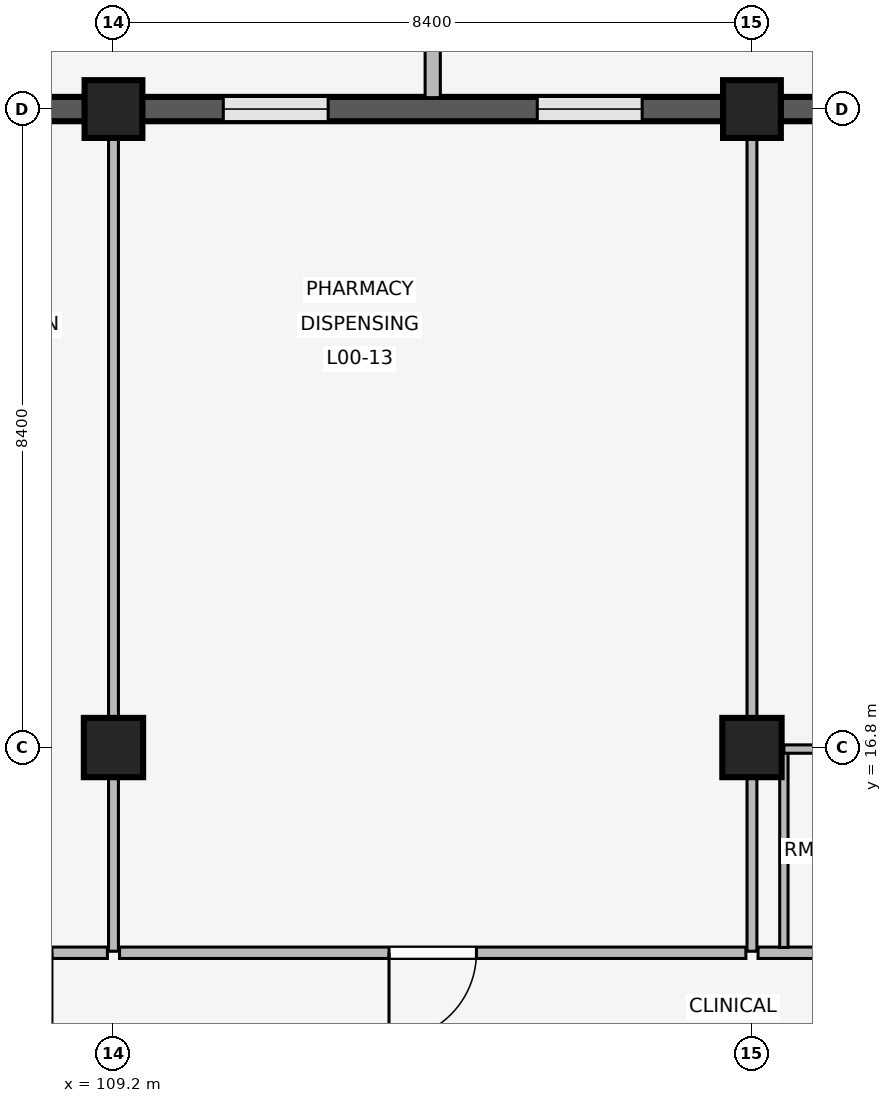
"""IFC4 building model, lengths in metres.
Left out: names, types, materials, properties, quantities, classifications, styles, units other than length and angle.
Written with IfcOpenShell. Run it as: python <this file> out.ifc"""

import sys

from ifc_helpers import new_model, si_unit, direction, frame, frame_2d, origin, origin_2d, place, context, subcontext, project, spatial, rectangle, extrude, element, fill, save


model = new_model("IFC4")
c1 = context("Model", 3, precision=1e-05, world=origin(), true_north=direction((0.0, 1.0)))
c2 = subcontext(c1, "Body", "Model", "MODEL_VIEW")
j1 = project(units=[si_unit("LENGTHUNIT", "METRE"), si_unit("PLANEANGLEUNIT", "RADIAN")], contexts=[c1])
p1 = place(None, origin())
s1 = spatial("IfcSite", under=j1, at=p1, CompositionType="ELEMENT")
p2 = place(p1, origin())
s2 = spatial("IfcBuilding", under=s1, at=p2, CompositionType="ELEMENT")
p3 = place(p2, origin())
s3 = spatial("IfcBuildingStorey", under=s2, at=p3, CompositionType="ELEMENT", Elevation=0.0)
p4 = place(p3, frame((109.2, 16.8, 0.0), z_axis=(0.0, 0.0, 1.0), x_axis=(1.0, 0.0, 0.0)))
e1 = element("IfcColumn", 1, at=p4, inside=s3, PredefinedType="COLUMN", context=c2, shape_type="SweptSolid", body=[
    extrude(rectangle(XDim=0.78, YDim=0.78, at=origin_2d()), origin(), (0.0, 0.0, 1.0), 4.8),
])
p5 = place(p3, frame((109.2, 25.2, 0.0), z_axis=(0.0, 0.0, 1.0), x_axis=(1.0, 0.0, 0.0)))
e2 = element("IfcColumn", 2, at=p5, inside=s3, PredefinedType="COLUMN", context=c2, shape_type="SweptSolid", body=[
    extrude(rectangle(XDim=0.76, YDim=0.76, at=origin_2d()), origin(), (0.0, 0.0, 1.0), 4.8),
])
p6 = place(p3, frame((117.6, 16.8, 0.0), z_axis=(0.0, 0.0, 1.0), x_axis=(1.0, 0.0, 0.0)))
e3 = element("IfcColumn", 3, at=p6, inside=s3, PredefinedType="COLUMN", context=c2, shape_type="SweptSolid", body=[
    extrude(rectangle(XDim=0.78, YDim=0.78, at=origin_2d()), origin(), (0.0, 0.0, 1.0), 4.8),
])
p7 = place(p3, frame((117.6, 25.2, 0.0), z_axis=(0.0, 0.0, 1.0), x_axis=(1.0, 0.0, 0.0)))
e4 = element("IfcColumn", 4, at=p7, inside=s3, PredefinedType="COLUMN", context=c2, shape_type="SweptSolid", body=[
    extrude(rectangle(XDim=0.76, YDim=0.76, at=origin_2d()), origin(), (0.0, 0.0, 1.0), 4.8),
])
p8 = place(p3, frame((101.175, 25.2, 0.0), z_axis=(0.0, 0.0, 1.0), x_axis=(1.0, 0.0, 0.0)))
e5 = element("IfcWall", 5, at=p8, inside=s3, PredefinedType="SOLIDWALL", context=c2, shape_type="SweptSolid", body=[
    extrude(rectangle(XDim=7.65, YDim=0.32, at=frame_2d((3.825, 0.0))), origin(), (0.0, 0.0, 1.0), 3.82),
])
p9 = place(p8, frame((0.919, 0.0, 0.85)))
e6 = element("IfcOpeningElement", 6, at=p9, cuts=e5, PredefinedType="OPENING", context=c2, shape_type="SweptSolid", body=[
    extrude(rectangle(XDim=1.68, YDim=2.05, at=frame_2d((0.84, 1.025))), frame((0.0, 0.17, 0.0), z_axis=(0.0, -1.0, 0.0), x_axis=(1.0, 0.0, 0.0)), (0.0, 0.0, 1.0), 0.34),
])
p10 = place(p8, frame((5.051, 0.0, 0.85)))
e7 = element("IfcOpeningElement", 7, at=p10, cuts=e5, PredefinedType="OPENING", context=c2, shape_type="SweptSolid", body=[
    extrude(rectangle(XDim=1.68, YDim=2.05, at=frame_2d((0.84, 1.025))), frame((0.0, 0.17, 0.0), z_axis=(0.0, -1.0, 0.0), x_axis=(1.0, 0.0, 0.0)), (0.0, 0.0, 1.0), 0.34),
])
p11 = place(p3, frame((109.575, 25.2, 0.0), z_axis=(0.0, 0.0, 1.0), x_axis=(1.0, 0.0, 0.0)))
e8 = element("IfcWall", 8, at=p11, inside=s3, PredefinedType="SOLIDWALL", context=c2, shape_type="SweptSolid", body=[
    extrude(rectangle(XDim=7.65, YDim=0.32, at=frame_2d((3.825, 0.0))), origin(), (0.0, 0.0, 1.0), 3.82),
])
p12 = place(p11, frame((1.07, 0.0, 0.85)))
e9 = element("IfcOpeningElement", 9, at=p12, cuts=e8, PredefinedType="OPENING", context=c2, shape_type="SweptSolid", body=[
    extrude(rectangle(XDim=1.38, YDim=1.5, at=frame_2d((0.69, 0.75))), frame((0.0, 0.17, 0.0), z_axis=(0.0, -1.0, 0.0), x_axis=(1.0, 0.0, 0.0)), (0.0, 0.0, 1.0), 0.34),
])
p13 = place(p11, frame((5.2, 0.0, 0.85)))
e10 = element("IfcOpeningElement", 10, at=p13, cuts=e8, PredefinedType="OPENING", context=c2, shape_type="SweptSolid", body=[
    extrude(rectangle(XDim=1.38, YDim=1.5, at=frame_2d((0.69, 0.75))), frame((0.0, 0.17, 0.0), z_axis=(0.0, -1.0, 0.0), x_axis=(1.0, 0.0, 0.0)), (0.0, 0.0, 1.0), 0.34),
])
p14 = place(p3, frame((113.4, 25.35, 0.0), z_axis=(0.0, 0.0, 1.0), x_axis=(0.0, 1.0, 0.0)))
e11 = element("IfcWall", 11, at=p14, inside=s3, PredefinedType="ELEMENTEDWALL", context=c2, shape_type="SweptSolid", body=[
    extrude(rectangle(XDim=0.85, YDim=0.2, at=frame_2d((0.425, 0.0))), origin(), (0.0, 0.0, 1.0), 3.8),
])
p15 = place(p3, frame((117.975, 25.2, 0.0), z_axis=(0.0, 0.0, 1.0), x_axis=(1.0, 0.0, 0.0)))
e12 = element("IfcWall", 12, at=p15, inside=s3, PredefinedType="SOLIDWALL", context=c2, shape_type="SweptSolid", body=[
    extrude(rectangle(XDim=7.65, YDim=0.32, at=frame_2d((3.825, 0.0))), origin(), (0.0, 0.0, 1.0), 3.82),
])
p16 = place(p15, frame((0.979, 0.0, 0.85)))
e13 = element("IfcOpeningElement", 13, at=p16, cuts=e12, PredefinedType="OPENING", context=c2, shape_type="SweptSolid", body=[
    extrude(rectangle(XDim=1.56, YDim=1.7, at=frame_2d((0.78, 0.85))), frame((0.0, 0.17, 0.0), z_axis=(0.0, -1.0, 0.0), x_axis=(1.0, 0.0, 0.0)), (0.0, 0.0, 1.0), 0.34),
])
p17 = place(p15, frame((5.111, 0.0, 0.85)))
e14 = element("IfcOpeningElement", 14, at=p17, cuts=e12, PredefinedType="OPENING", context=c2, shape_type="SweptSolid", body=[
    extrude(rectangle(XDim=1.56, YDim=1.7, at=frame_2d((0.78, 0.85))), frame((0.0, 0.17, 0.0), z_axis=(0.0, -1.0, 0.0), x_axis=(1.0, 0.0, 0.0)), (0.0, 0.0, 1.0), 0.34),
])
p18 = place(p3, frame((109.12, 14.1, 0.0), z_axis=(0.0, 0.0, 1.0), x_axis=(-1.0, 0.0, 0.0)))
e15 = element("IfcWall", 15, at=p18, inside=s3, PredefinedType="PARTITIONING", context=c2, shape_type="SweptSolid", body=[
    extrude(rectangle(XDim=7.96, YDim=0.15, at=frame_2d((3.98, 0.0))), origin(), (0.0, 0.0, 1.0), 3.8),
])
p19 = place(p18, frame((0.73, 0.0, 0.0)))
e16 = element("IfcOpeningElement", 16, at=p19, cuts=e15, PredefinedType="OPENING", context=c2, shape_type="SweptSolid", body=[
    extrude(rectangle(XDim=1.05, YDim=2.2, at=frame_2d((0.525, 1.1))), frame((0.0, 0.085, 0.0), z_axis=(0.0, -1.0, 0.0), x_axis=(1.0, 0.0, 0.0)), (0.0, 0.0, 1.0), 0.17),
])
p20 = place(p18, frame((4.43, 0.0, 0.0)))
e17 = element("IfcOpeningElement", 17, at=p20, cuts=e15, PredefinedType="OPENING", context=c2, shape_type="SweptSolid", body=[
    extrude(rectangle(XDim=1.05, YDim=2.2, at=frame_2d((0.525, 1.1))), frame((0.0, 0.085, 0.0), z_axis=(0.0, -1.0, 0.0), x_axis=(1.0, 0.0, 0.0)), (0.0, 0.0, 1.0), 0.17),
])
p21 = place(p3, frame((109.2, 14.12, 0.0), z_axis=(0.0, 0.0, 1.0), x_axis=(0.0, 1.0, 0.0)))
e18 = element("IfcWall", 18, at=p21, inside=s3, PredefinedType="PARTITIONING", context=c2, shape_type="SweptSolid", body=[
    extrude(rectangle(XDim=10.94, YDim=0.13, at=frame_2d((5.47, 0.0))), origin(), (0.0, 0.0, 1.0), 3.8),
])
p22 = place(p3, frame((117.52, 14.1, 0.0), z_axis=(0.0, 0.0, 1.0), x_axis=(-1.0, 0.0, 0.0)))
e19 = element("IfcWall", 19, at=p22, inside=s3, PredefinedType="PARTITIONING", context=c2, shape_type="SweptSolid", body=[
    extrude(rectangle(XDim=8.24, YDim=0.15, at=frame_2d((4.12, 0.0))), origin(), (0.0, 0.0, 1.0), 3.8),
])
p23 = place(p22, frame((3.545, 0.0, 0.0)))
e20 = element("IfcOpeningElement", 20, at=p23, cuts=e19, PredefinedType="OPENING", context=c2, shape_type="SweptSolid", body=[
    extrude(rectangle(XDim=1.15, YDim=2.2, at=frame_2d((0.575, 1.1))), frame((0.0, 0.085, 0.0), z_axis=(0.0, -1.0, 0.0), x_axis=(1.0, 0.0, 0.0)), (0.0, 0.0, 1.0), 0.17),
])
p24 = place(p3, frame((117.6, 14.12, 0.0), z_axis=(0.0, 0.0, 1.0), x_axis=(0.0, 1.0, 0.0)))
e21 = element("IfcWall", 21, at=p24, inside=s3, PredefinedType="PARTITIONING", context=c2, shape_type="SweptSolid", body=[
    extrude(rectangle(XDim=10.94, YDim=0.13, at=frame_2d((5.47, 0.0))), origin(), (0.0, 0.0, 1.0), 3.8),
])
p25 = place(p3, frame((125.92, 14.1, 0.0), z_axis=(0.0, 0.0, 1.0), x_axis=(-1.0, 0.0, 0.0)))
e22 = element("IfcWall", 22, at=p25, inside=s3, PredefinedType="PARTITIONING", context=c2, shape_type="SweptSolid", body=[
    extrude(rectangle(XDim=8.24, YDim=0.15, at=frame_2d((4.12, 0.0))), origin(), (0.0, 0.0, 1.0), 3.8),
])
p26 = place(p25, frame((0.73, 0.0, 0.0)))
e23 = element("IfcOpeningElement", 23, at=p26, cuts=e22, PredefinedType="OPENING", context=c2, shape_type="SweptSolid", body=[
    extrude(rectangle(XDim=1.05, YDim=2.2, at=frame_2d((0.525, 1.1))), frame((0.0, 0.085, 0.0), z_axis=(0.0, -1.0, 0.0), x_axis=(1.0, 0.0, 0.0)), (0.0, 0.0, 1.0), 0.17),
])
p27 = place(p25, frame((4.43, 0.0, 0.0)))
e24 = element("IfcOpeningElement", 24, at=p27, cuts=e22, PredefinedType="OPENING", context=c2, shape_type="SweptSolid", body=[
    extrude(rectangle(XDim=1.05, YDim=2.2, at=frame_2d((0.525, 1.1))), frame((0.0, 0.085, 0.0), z_axis=(0.0, -1.0, 0.0), x_axis=(1.0, 0.0, 0.0)), (0.0, 0.0, 1.0), 0.17),
])
p28 = place(p3, frame((118.02, 14.17, 0.0), z_axis=(0.0, 0.0, 1.0), x_axis=(0.0, 1.0, 0.0)))
e25 = element("IfcWall", 25, at=p28, inside=s3, PredefinedType="PARTITIONING", context=c2, shape_type="SweptSolid", body=[
    extrude(rectangle(XDim=2.61, YDim=0.11, at=frame_2d((1.305, 0.0))), origin(), (0.0, 0.0, 1.0), 3.8),
])
p29 = place(p3, frame((118.02, 16.78, 0.0), z_axis=(0.0, 0.0, 1.0), x_axis=(1.0, 0.0, 0.0)))
e26 = element("IfcWall", 26, at=p29, inside=s3, PredefinedType="PARTITIONING", context=c2, shape_type="SweptSolid", body=[
    extrude(rectangle(XDim=1.98, YDim=0.11, at=frame_2d((0.99, 0.0))), origin(), (0.0, 0.0, 1.0), 3.8),
])
p30 = place(p29, frame((0.54, 0.0, 0.0)))
e27 = element("IfcOpeningElement", 27, at=p30, cuts=e26, PredefinedType="OPENING", context=c2, shape_type="SweptSolid", body=[
    extrude(rectangle(XDim=0.9, YDim=2.1, at=frame_2d((0.45, 1.05))), frame((0.0, 0.065, 0.0), z_axis=(0.0, -1.0, 0.0), x_axis=(1.0, 0.0, 0.0)), (0.0, 0.0, 1.0), 0.13),
])
p31 = place(p12, origin())
e28 = element("IfcWindow", 28, at=p31, inside=s3, PartitioningType="SINGLE_PANEL", PredefinedType="WINDOW", context=c2, shape_type="SweptSolid", body=[
    extrude(rectangle(XDim=1.38, YDim=1.5, at=frame_2d((0.69, 0.75))), frame((0.0, 0.03, 0.0), z_axis=(0.0, -1.0, 0.0), x_axis=(1.0, 0.0, 0.0)), (0.0, 0.0, 1.0), 0.06),
])
fill(e9, e28)
p32 = place(p13, origin())
e29 = element("IfcWindow", 29, at=p32, inside=s3, PartitioningType="SINGLE_PANEL", PredefinedType="WINDOW", context=c2, shape_type="SweptSolid", body=[
    extrude(rectangle(XDim=1.38, YDim=1.5, at=frame_2d((0.69, 0.75))), frame((0.0, 0.03, 0.0), z_axis=(0.0, -1.0, 0.0), x_axis=(1.0, 0.0, 0.0)), (0.0, 0.0, 1.0), 0.06),
])
fill(e10, e29)
p33 = place(p23, origin())
e30 = element("IfcDoor", 30, at=p33, inside=s3, OperationType="SINGLE_SWING_RIGHT", PredefinedType="DOOR", context=c2, shape_type="SweptSolid", body=[
    extrude(rectangle(XDim=1.15, YDim=2.2, at=frame_2d((0.575, 1.1))), frame((0.0, 0.025, 0.0), z_axis=(0.0, -1.0, 0.0), x_axis=(1.0, 0.0, 0.0)), (0.0, 0.0, 1.0), 0.05),
])
fill(e20, e30)
save(model, sys.argv[1])
